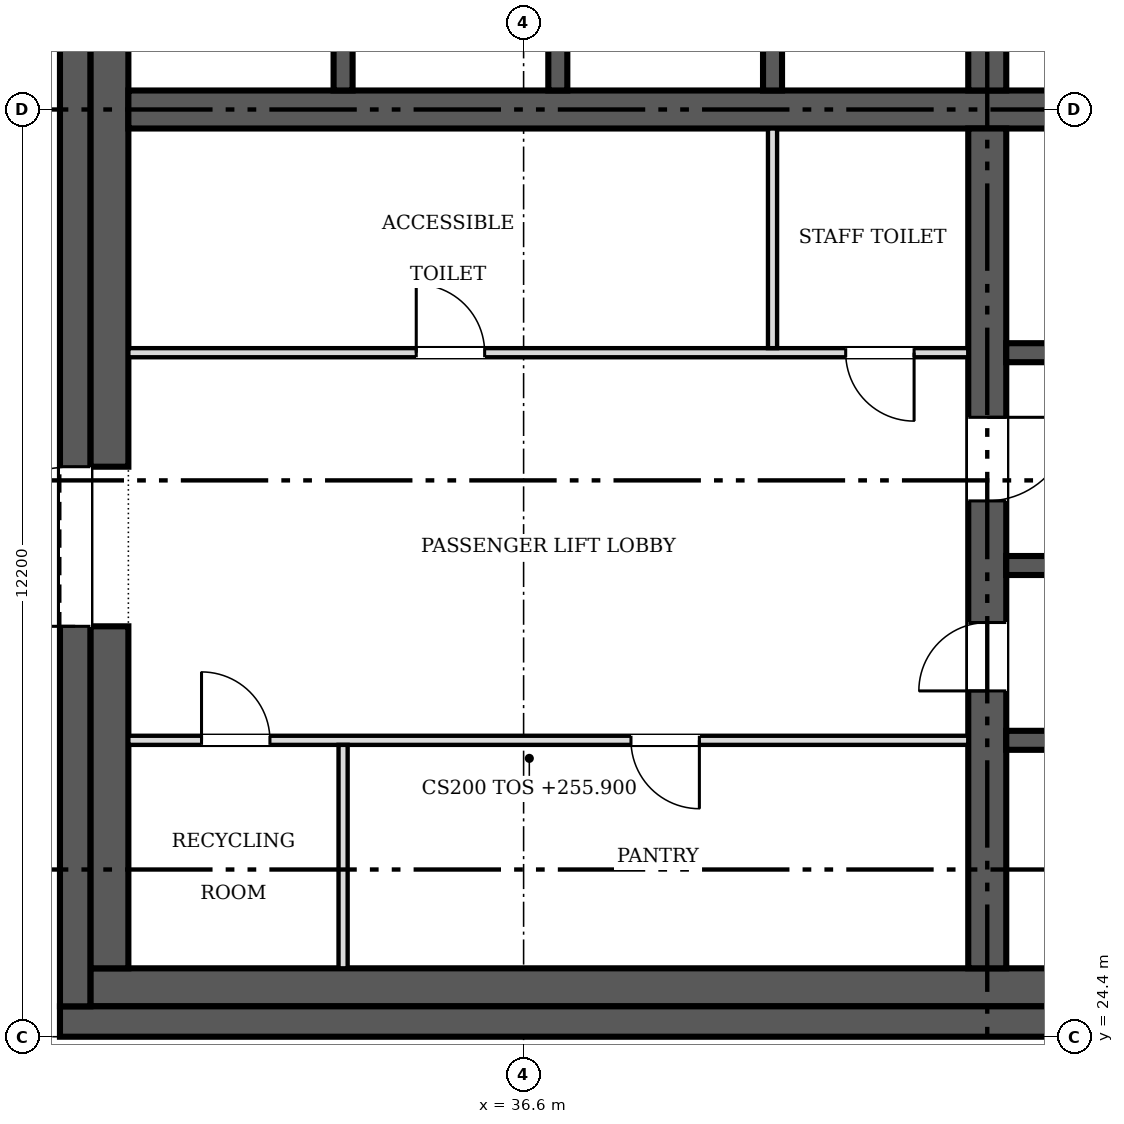
"""IFC4 building model, lengths in metres.
Left out: names, types, materials, properties, quantities, classifications, styles, units other than length and angle.
Written with IfcOpenShell. Run it as: python <this file> out.ifc"""

import sys

from ifc_helpers import new_model, si_unit, direction, frame, frame_2d, origin, place, context, subcontext, project, spatial, rectangle, extrude, source, transform, mapped, element, fill, save


model = new_model("IFC4")
c1 = context("Model", 3, precision=1e-05, world=origin(), true_north=direction((0.0, 1.0)))
c2 = subcontext(c1, "Body", "Model", "MODEL_VIEW")
j1 = project(units=[si_unit("LENGTHUNIT", "METRE"), si_unit("PLANEANGLEUNIT", "RADIAN")], contexts=[c1])
p1 = place(None, origin())
s1 = spatial("IfcSite", under=j1, at=p1, CompositionType="ELEMENT")
p2 = place(p1, origin())
s2 = spatial("IfcBuilding", under=s1, at=p2, CompositionType="ELEMENT")
p3 = place(p2, frame((0.0, 0.0, 255.9)))
s3 = spatial("IfcBuildingStorey", under=s2, at=p3, CompositionType="ELEMENT", Elevation=255.9)
p4 = place(p3, frame((54.9, 24.6, 0.0), z_axis=(0.0, 0.0, 1.0), x_axis=(-1.0, 0.0, 0.0)))
e1 = element("IfcWall", 1, at=p4, inside=s3, PredefinedType="SHEAR", context=c2, shape_type="SweptSolid", body=[
    extrude(rectangle(XDim=24.4, YDim=0.4, at=frame_2d((12.2, 0.0))), origin(), (0.0, 0.0, 1.0), 3.8),
])
m1 = source(origin(), c2, "Body", "SweptSolid", [
    extrude(rectangle(XDim=1.2, YDim=2.1, at=frame_2d((0.6, 1.05))), frame((0.0, 0.21, 0.0), z_axis=(0.0, -1.0, 0.0), x_axis=(1.0, 0.0, 0.0)), (0.0, 0.0, 1.0), 0.42),
])
p5 = place(p4, frame((1.5, 0.0, 0.0)))
e2 = element("IfcOpeningElement", 2, at=p5, cuts=e1, PredefinedType="OPENING", context=c2, shape_type="MappedRepresentation", body=[
    mapped(m1, transform((0.0, 0.0, 0.0), scale=1.0)),
])
p6 = place(p3, frame((30.7, 24.8, 0.0), z_axis=(0.0, 0.0, 1.0), x_axis=(0.0, 1.0, 0.0)))
e3 = element("IfcWall", 3, at=p6, inside=s3, PredefinedType="SHEAR", context=c2, shape_type="SweptSolid", body=[
    extrude(rectangle(XDim=23.6, YDim=0.4, at=frame_2d((11.8, 0.0))), origin(), (0.0, 0.0, 1.0), 3.8),
])
m2 = source(origin(), c2, "Body", "SweptSolid", [
    extrude(rectangle(XDim=2.1, YDim=2.4, at=frame_2d((1.05, 1.2))), frame((0.0, 0.21, 0.0), z_axis=(0.0, -1.0, 0.0), x_axis=(1.0, 0.0, 0.0)), (0.0, 0.0, 1.0), 0.42),
])
p7 = place(p6, frame((5.0, 0.0, 0.0)))
e4 = element("IfcOpeningElement", 4, at=p7, cuts=e3, PredefinedType="OPENING", context=c2, shape_type="MappedRepresentation", body=[
    mapped(m2, transform((0.0, 0.0, 0.0), scale=1.0)),
])
p8 = place(p6, frame((16.5, 0.0, 0.0)))
e5 = element("IfcOpeningElement", 5, at=p8, cuts=e3, PredefinedType="OPENING", context=c2, shape_type="MappedRepresentation", body=[
    mapped(m2, transform((0.0, 0.0, 0.0), scale=1.0)),
])
p9 = place(p3, frame((30.9, 25.05, 0.0), z_axis=(0.0, 0.0, 1.0), x_axis=(1.0, 0.0, 0.0)))
e6 = element("IfcWall", 6, at=p9, inside=s3, PredefinedType="SOLIDWALL", context=c2, shape_type="SweptSolid", body=[
    extrude(rectangle(XDim=21.3, YDim=0.5, at=frame_2d((10.65, 0.0))), origin(), (0.0, 0.0, 1.0), 3.8),
])
p10 = place(p3, frame((31.15, 25.3, 0.0), z_axis=(0.0, 0.0, 1.0), x_axis=(0.0, 1.0, 0.0)))
e7 = element("IfcWall", 7, at=p10, inside=s3, PredefinedType="SOLIDWALL", context=c2, shape_type="SweptSolid", body=[
    extrude(rectangle(XDim=4.5, YDim=0.5, at=frame_2d((2.25, 0.0))), origin(), (0.0, 0.0, 1.0), 3.8),
])
p11 = place(p3, frame((31.15, 31.9, 0.0), z_axis=(0.0, 0.0, 1.0), x_axis=(0.0, 1.0, 0.0)))
e8 = element("IfcWall", 8, at=p11, inside=s3, PredefinedType="SOLIDWALL", context=c2, shape_type="SweptSolid", body=[
    extrude(rectangle(XDim=9.4, YDim=0.5, at=frame_2d((4.7, 0.0))), origin(), (0.0, 0.0, 1.0), 3.8),
])
p12 = place(p3, frame((31.4, 36.6, 0.0), z_axis=(0.0, 0.0, 1.0), x_axis=(1.0, 0.0, 0.0)))
e9 = element("IfcWall", 9, at=p12, inside=s3, PredefinedType="SHEAR", context=c2, shape_type="SweptSolid", body=[
    extrude(rectangle(XDim=16.95, YDim=0.5, at=frame_2d((8.475, 0.0))), origin(), (0.0, 0.0, 1.0), 3.8),
])
p13 = place(p3, frame((42.7, 36.35, 0.0), z_axis=(0.0, 0.0, 1.0), x_axis=(0.0, -1.0, 0.0)))
e10 = element("IfcWall", 10, at=p13, inside=s3, PredefinedType="SHEAR", context=c2, shape_type="SweptSolid", body=[
    extrude(rectangle(XDim=11.05, YDim=0.5, at=frame_2d((5.525, 0.0))), origin(), (0.0, 0.0, 1.0), 3.8),
])
m3 = source(origin(), c2, "Body", "SweptSolid", [
    extrude(rectangle(XDim=0.9, YDim=2.1, at=frame_2d((0.45, 1.05))), frame((0.0, 0.26, 0.0), z_axis=(0.0, -1.0, 0.0), x_axis=(1.0, 0.0, 0.0)), (0.0, 0.0, 1.0), 0.52),
])
p14 = place(p13, frame((6.5, 0.0, 0.0)))
e11 = element("IfcOpeningElement", 11, at=p14, cuts=e10, PredefinedType="OPENING", context=c2, shape_type="MappedRepresentation", body=[
    mapped(m3, transform((0.0, 0.0, 0.0), scale=1.0)),
])
m4 = source(origin(), c2, "Body", "SweptSolid", [
    extrude(rectangle(XDim=1.1, YDim=2.1, at=frame_2d((0.55, 1.05))), frame((0.0, 0.26, 0.0), z_axis=(0.0, -1.0, 0.0), x_axis=(1.0, 0.0, 0.0)), (0.0, 0.0, 1.0), 0.52),
])
p15 = place(p13, frame((3.8, 0.0, 0.0)))
e12 = element("IfcOpeningElement", 12, at=p15, cuts=e10, PredefinedType="OPENING", context=c2, shape_type="MappedRepresentation", body=[
    mapped(m4, transform((0.0, 0.0, 0.0), scale=1.0)),
])
p16 = place(p3, frame((42.7, 36.85, 0.0), z_axis=(0.0, 0.0, 1.0), x_axis=(0.0, 1.0, 0.0)))
e13 = element("IfcWall", 13, at=p16, inside=s3, PredefinedType="SHEAR", context=c2, shape_type="SweptSolid", body=[
    extrude(rectangle(XDim=2.95, YDim=0.5, at=frame_2d((1.475, 0.0))), origin(), (0.0, 0.0, 1.0), 3.8),
])
p17 = place(p3, frame((48.225, 33.4, 0.0), z_axis=(0.0, 0.0, 1.0), x_axis=(-1.0, 0.0, 0.0)))
e14 = element("IfcWall", 14, at=p17, inside=s3, PredefinedType="SOLIDWALL", context=c2, shape_type="SweptSolid", body=[
    extrude(rectangle(XDim=5.275, YDim=0.25, at=frame_2d((2.638, 0.0))), origin(), (0.0, 0.0, 1.0), 3.8),
])
m5 = source(origin(), c2, "Body", "SweptSolid", [
    extrude(rectangle(XDim=1.2, YDim=2.1, at=frame_2d((0.6, 1.05))), frame((0.0, 0.135, 0.0), z_axis=(0.0, -1.0, 0.0), x_axis=(1.0, 0.0, 0.0)), (0.0, 0.0, 1.0), 0.27),
])
p18 = place(p17, frame((3.512, 0.0, 0.0)))
e15 = element("IfcOpeningElement", 15, at=p18, cuts=e14, PredefinedType="OPENING", context=c2, shape_type="MappedRepresentation", body=[
    mapped(m5, transform((0.0, 0.0, 0.0), scale=1.0)),
])
p19 = place(p17, frame((0.688, 0.0, 0.0)))
e16 = element("IfcOpeningElement", 16, at=p19, cuts=e14, PredefinedType="OPENING", context=c2, shape_type="MappedRepresentation", body=[
    mapped(m5, transform((0.0, 0.0, 0.0), scale=1.0)),
])
for number, where, z_axis, x_axis in (
    (17, (42.95, 28.3, 0.0), (0.0, 0.0, 1.0), (1.0, 0.0, 0.0)),
    (18, (42.95, 30.6, 0.0), (0.0, 0.0, 1.0), (1.0, 0.0, 0.0)),
):
    element("IfcWall", number, at=place(p3, frame(where, z_axis=z_axis, x_axis=x_axis)), inside=s3, PredefinedType="SOLIDWALL", context=c2, shape_type="SweptSolid", body=[
        extrude(rectangle(XDim=5.275, YDim=0.25, at=frame_2d((2.638, 0.0))), origin(), (0.0, 0.0, 1.0), 3.8),
    ])
for number, where, z_axis, x_axis in (
    (19, (34.225, 36.85, 0.0), (0.0, 0.0, 1.0), (0.0, 1.0, 0.0)),
    (20, (37.05, 36.85, 0.0), (0.0, 0.0, 1.0), (0.0, 1.0, 0.0)),
    (21, (39.875, 36.85, 0.0), (0.0, 0.0, 1.0), (0.0, 1.0, 0.0)),
):
    element("IfcWall", number, at=place(p3, frame(where, z_axis=z_axis, x_axis=x_axis)), inside=s3, PredefinedType="SOLIDWALL", context=c2, shape_type="SweptSolid", body=[
        extrude(rectangle(XDim=2.825, YDim=0.25, at=frame_2d((1.413, 0.0))), origin(), (0.0, 0.0, 1.0), 3.8),
    ])
p20 = place(p3, frame((42.45, 28.3, 0.0), z_axis=(0.0, 0.0, 1.0), x_axis=(-1.0, 0.0, 0.0)))
e22 = element("IfcWall", 22, at=p20, inside=s3, PredefinedType="PARTITIONING", context=c2, shape_type="SweptSolid", body=[
    extrude(rectangle(XDim=11.05, YDim=0.12, at=frame_2d((5.525, 0.0))), origin(), (0.0, 0.0, 1.0), 3.55),
])
m6 = source(origin(), c2, "Body", "SweptSolid", [
    extrude(rectangle(XDim=0.9, YDim=2.1, at=frame_2d((0.45, 1.05))), frame((0.0, 0.07, 0.0), z_axis=(0.0, -1.0, 0.0), x_axis=(1.0, 0.0, 0.0)), (0.0, 0.0, 1.0), 0.14),
])
p21 = place(p20, frame((9.188, 0.0, 0.0)))
e23 = element("IfcOpeningElement", 23, at=p21, cuts=e22, PredefinedType="OPENING", context=c2, shape_type="MappedRepresentation", body=[
    mapped(m6, transform((0.0, 0.0, 0.0), scale=1.0)),
])
p22 = place(p20, frame((3.538, 0.0, 0.0)))
e24 = element("IfcOpeningElement", 24, at=p22, cuts=e22, PredefinedType="OPENING", context=c2, shape_type="MappedRepresentation", body=[
    mapped(m6, transform((0.0, 0.0, 0.0), scale=1.0)),
])
p23 = place(p3, frame((31.4, 33.4, 0.0), z_axis=(0.0, 0.0, 1.0), x_axis=(1.0, 0.0, 0.0)))
e25 = element("IfcWall", 25, at=p23, inside=s3, PredefinedType="PARTITIONING", context=c2, shape_type="SweptSolid", body=[
    extrude(rectangle(XDim=11.05, YDim=0.12, at=frame_2d((5.525, 0.0))), origin(), (0.0, 0.0, 1.0), 3.55),
])
p24 = place(p23, frame((3.788, 0.0, 0.0)))
e26 = element("IfcOpeningElement", 26, at=p24, cuts=e25, PredefinedType="OPENING", context=c2, shape_type="MappedRepresentation", body=[
    mapped(m6, transform((0.0, 0.0, 0.0), scale=1.0)),
])
p25 = place(p23, frame((9.438, 0.0, 0.0)))
e27 = element("IfcOpeningElement", 27, at=p25, cuts=e25, PredefinedType="OPENING", context=c2, shape_type="MappedRepresentation", body=[
    mapped(m6, transform((0.0, 0.0, 0.0), scale=1.0)),
])
p26 = place(p3, frame((39.875, 33.46, 0.0), z_axis=(0.0, 0.0, 1.0), x_axis=(0.0, 1.0, 0.0)))
e28 = element("IfcWall", 28, at=p26, inside=s3, PredefinedType="PARTITIONING", context=c2, shape_type="SweptSolid", body=[
    extrude(rectangle(XDim=2.89, YDim=0.12, at=frame_2d((1.445, 0.0))), origin(), (0.0, 0.0, 1.0), 3.55),
])
p27 = place(p3, frame((34.225, 25.3, 0.0), z_axis=(0.0, 0.0, 1.0), x_axis=(0.0, 1.0, 0.0)))
e29 = element("IfcWall", 29, at=p27, inside=s3, PredefinedType="PARTITIONING", context=c2, shape_type="SweptSolid", body=[
    extrude(rectangle(XDim=2.94, YDim=0.12, at=frame_2d((1.47, 0.0))), origin(), (0.0, 0.0, 1.0), 3.55),
])
m7 = source(origin(), c2, "Body", "SweptSolid", [
    extrude(rectangle(XDim=2.1, YDim=2.4, at=frame_2d((1.05, 1.2))), frame((0.0, 0.025, 0.0), z_axis=(0.0, -1.0, 0.0), x_axis=(1.0, 0.0, 0.0)), (0.0, 0.0, 1.0), 0.05),
])
p28 = place(p7, origin())
e30 = element("IfcDoor", 30, at=p28, inside=s3, OperationType="DOUBLE_DOOR_SINGLE_SWING", PredefinedType="DOOR", context=c2, shape_type="MappedRepresentation", body=[
    mapped(m7, transform((0.0, 0.0, 0.0), scale=1.0)),
])
fill(e4, e30)
m8 = source(origin(), c2, "Body", "SweptSolid", [
    extrude(rectangle(XDim=0.9, YDim=2.1, at=frame_2d((0.45, 1.05))), frame((0.0, 0.025, 0.0), z_axis=(0.0, -1.0, 0.0), x_axis=(1.0, 0.0, 0.0)), (0.0, 0.0, 1.0), 0.05),
])
p29 = place(p14, origin())
e31 = element("IfcDoor", 31, at=p29, inside=s3, OperationType="SINGLE_SWING_RIGHT", PredefinedType="DOOR", context=c2, shape_type="MappedRepresentation", body=[
    mapped(m8, transform((0.0, 0.0, 0.0), scale=1.0)),
])
fill(e11, e31)
m9 = source(origin(), c2, "Body", "SweptSolid", [
    extrude(rectangle(XDim=1.1, YDim=2.1, at=frame_2d((0.55, 1.05))), frame((0.0, 0.025, 0.0), z_axis=(0.0, -1.0, 0.0), x_axis=(1.0, 0.0, 0.0)), (0.0, 0.0, 1.0), 0.05),
])
p30 = place(p15, origin())
e32 = element("IfcDoor", 32, at=p30, inside=s3, OperationType="SINGLE_SWING_LEFT", PredefinedType="DOOR", context=c2, shape_type="MappedRepresentation", body=[
    mapped(m9, transform((0.0, 0.0, 0.0), scale=1.0)),
])
fill(e12, e32)
p31 = place(p21, origin())
e33 = element("IfcDoor", 33, at=p31, inside=s3, OperationType="SINGLE_SWING_RIGHT", PredefinedType="DOOR", context=c2, shape_type="MappedRepresentation", body=[
    mapped(m8, transform((0.0, 0.0, 0.0), scale=1.0)),
])
fill(e23, e33)
p32 = place(p22, origin())
e34 = element("IfcDoor", 34, at=p32, inside=s3, OperationType="SINGLE_SWING_LEFT", PredefinedType="DOOR", context=c2, shape_type="MappedRepresentation", body=[
    mapped(m8, transform((0.0, 0.0, 0.0), scale=1.0)),
])
fill(e24, e34)
p33 = place(p24, origin())
e35 = element("IfcDoor", 35, at=p33, inside=s3, OperationType="SINGLE_SWING_LEFT", PredefinedType="DOOR", context=c2, shape_type="MappedRepresentation", body=[
    mapped(m8, transform((0.0, 0.0, 0.0), scale=1.0)),
])
fill(e26, e35)
p34 = place(p25, origin())
e36 = element("IfcDoor", 36, at=p34, inside=s3, OperationType="SINGLE_SWING_RIGHT", PredefinedType="DOOR", context=c2, shape_type="MappedRepresentation", body=[
    mapped(m8, transform((0.0, 0.0, 0.0), scale=1.0)),
])
fill(e27, e36)
save(model, sys.argv[1])
